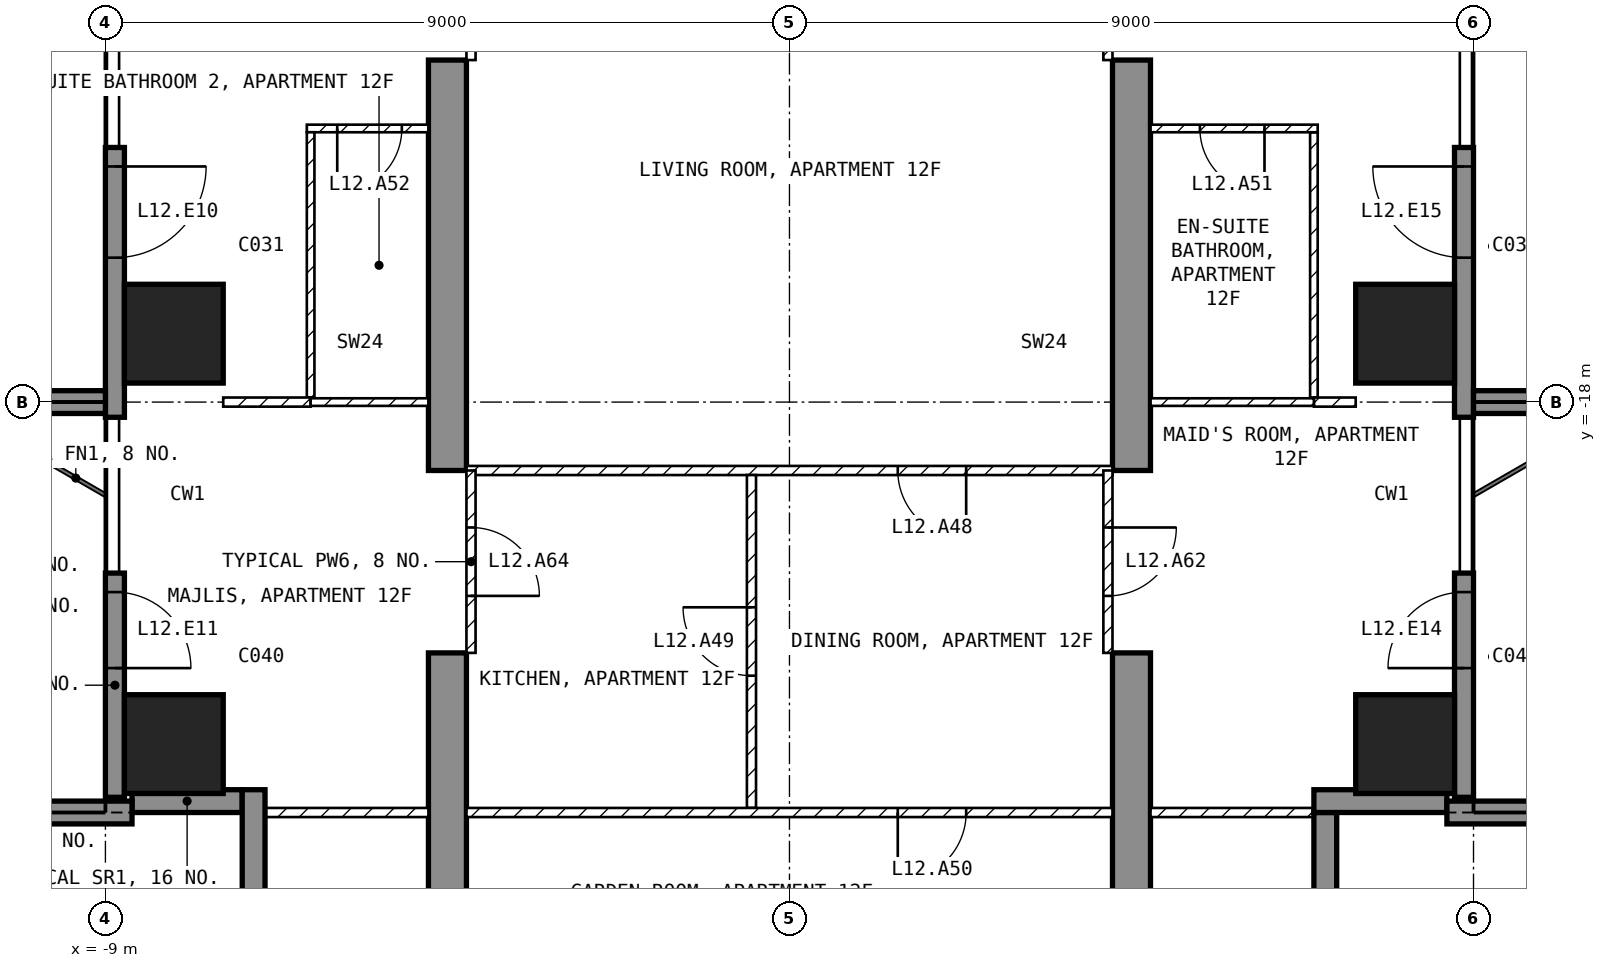
"""IFC4 building model, lengths in metres.
Left out: names, types, materials, properties, quantities, classifications, styles, units other than length and angle.
Written with IfcOpenShell. Run it as: python <this file> out.ifc"""

import sys

from ifc_helpers import new_model, si_unit, direction, frame, frame_2d, origin, origin_2d, place, context, subcontext, project, spatial, polyline, rectangle, outline, extrude, element, fill, save


model = new_model("IFC4")
c1 = context("Model", 3, precision=1e-05, world=origin(), true_north=direction((0.0, 1.0)))
c2 = subcontext(c1, "Body", "Model", "MODEL_VIEW")
j1 = project(units=[si_unit("LENGTHUNIT", "METRE"), si_unit("PLANEANGLEUNIT", "RADIAN")], contexts=[c1])
p1 = place(None, origin())
s1 = spatial("IfcSite", under=j1, at=p1, CompositionType="ELEMENT")
p2 = place(p1, origin())
s2 = spatial("IfcBuilding", under=s1, at=p2, CompositionType="ELEMENT")
p3 = place(p2, frame((0.0, 0.0, 61.0)))
s3 = spatial("IfcBuildingStorey", under=s2, at=p3, CompositionType="ELEMENT", Elevation=61.0)
for number, where, z_axis, x_axis in (
    (1, (-8.1, -22.5, -0.25), (0.0, 0.0, 1.0), (1.0, 0.0, 0.0)),
    (2, (-8.1, -17.1, -0.25), (0.0, 0.0, 1.0), (1.0, 0.0, 0.0)),
    (3, (8.1, -22.5, -0.25), (0.0, 0.0, 1.0), (1.0, 0.0, 0.0)),
    (4, (8.1, -17.1, -0.25), (0.0, 0.0, 1.0), (1.0, 0.0, 0.0)),
):
    element("IfcColumn", number, at=place(p3, frame(where, z_axis=z_axis, x_axis=x_axis)), inside=s3, PredefinedType="COLUMN", context=c2, shape_type="SweptSolid", body=[
        extrude(rectangle(XDim=1.3, YDim=1.3, at=origin_2d()), origin(), (0.0, 0.0, 1.0), 3.5),
    ])
for number, where, z_axis, x_axis in (
    (5, (-4.75, -25.45, -0.25), (1.0, 0.0, 0.0), (0.0, 1.0, 0.0)),
    (6, (4.25, -25.45, -0.25), (1.0, 0.0, 0.0), (0.0, 1.0, 0.0)),
):
    element("IfcWall", number, at=place(p3, frame(where, z_axis=z_axis, x_axis=x_axis)), inside=s3, PredefinedType="SHEAR", context=c2, shape_type="SweptSolid", body=[
        extrude(outline(polyline([(0.0, 0.0), (4.15, 0.0), (4.15, 2.65), (6.55, 2.65), (6.55, 0.0), (11.95, 0.0), (11.95, 2.65), (14.35, 2.65), (14.35, 0.0), (16.45, 0.0), (16.45, 3.5), (0.0, 3.5), (0.0, 0.0)])), origin(), (0.0, 0.0, 1.0), 0.5),
    ])
p4 = place(p3, frame((-8.875, -14.65, 0.0), z_axis=(0.0, 0.0, 1.0), x_axis=(0.0, -1.0, 0.0)))
e7 = element("IfcWall", 7, at=p4, inside=s3, PredefinedType="SOLIDWALL", context=c2, shape_type="SweptSolid", body=[
    extrude(rectangle(XDim=3.55, YDim=0.25, at=frame_2d((1.775, 0.0))), origin(), (0.0, 0.0, 1.0), 3.25),
])
p5 = place(p4, frame((0.25, 0.0, 0.0)))
e8 = element("IfcOpeningElement", 8, at=p5, cuts=e7, PredefinedType="OPENING", context=c2, shape_type="SweptSolid", body=[
    extrude(rectangle(XDim=1.2, YDim=2.4, at=frame_2d((0.6, 1.2))), frame((0.0, 0.135, 0.0), z_axis=(0.0, -1.0, 0.0), x_axis=(1.0, 0.0, 0.0)), (0.0, 0.0, 1.0), 0.27),
])
p6 = place(p3, frame((-8.875, -20.25, 0.0), z_axis=(0.0, 0.0, 1.0), x_axis=(0.0, -1.0, 0.0)))
e9 = element("IfcWall", 9, at=p6, inside=s3, PredefinedType="SOLIDWALL", context=c2, shape_type="SweptSolid", body=[
    extrude(rectangle(XDim=2.95, YDim=0.25, at=frame_2d((1.475, 0.0))), origin(), (0.0, 0.0, 1.0), 3.25),
])
p7 = place(p6, frame((0.25, 0.0, 0.0)))
e10 = element("IfcOpeningElement", 10, at=p7, cuts=e9, PredefinedType="OPENING", context=c2, shape_type="SweptSolid", body=[
    extrude(rectangle(XDim=1.0, YDim=2.4, at=frame_2d((0.5, 1.2))), frame((0.0, 0.135, 0.0), z_axis=(0.0, -1.0, 0.0), x_axis=(1.0, 0.0, 0.0)), (0.0, 0.0, 1.0), 0.27),
])
p8 = place(p3, frame((8.875, -23.2, 0.0), z_axis=(0.0, 0.0, 1.0), x_axis=(0.0, 1.0, 0.0)))
e11 = element("IfcWall", 11, at=p8, inside=s3, PredefinedType="SOLIDWALL", context=c2, shape_type="SweptSolid", body=[
    extrude(rectangle(XDim=2.95, YDim=0.25, at=frame_2d((1.475, 0.0))), origin(), (0.0, 0.0, 1.0), 3.25),
])
p9 = place(p8, frame((1.7, 0.0, 0.0)))
e12 = element("IfcOpeningElement", 12, at=p9, cuts=e11, PredefinedType="OPENING", context=c2, shape_type="SweptSolid", body=[
    extrude(rectangle(XDim=1.0, YDim=2.4, at=frame_2d((0.5, 1.2))), frame((0.0, 0.135, 0.0), z_axis=(0.0, -1.0, 0.0), x_axis=(1.0, 0.0, 0.0)), (0.0, 0.0, 1.0), 0.27),
])
p10 = place(p3, frame((8.875, -18.2, 0.0), z_axis=(0.0, 0.0, 1.0), x_axis=(0.0, 1.0, 0.0)))
e13 = element("IfcWall", 13, at=p10, inside=s3, PredefinedType="SOLIDWALL", context=c2, shape_type="SweptSolid", body=[
    extrude(rectangle(XDim=3.55, YDim=0.25, at=frame_2d((1.775, 0.0))), origin(), (0.0, 0.0, 1.0), 3.25),
])
p11 = place(p10, frame((2.1, 0.0, 0.0)))
e14 = element("IfcOpeningElement", 14, at=p11, cuts=e13, PredefinedType="OPENING", context=c2, shape_type="SweptSolid", body=[
    extrude(rectangle(XDim=1.2, YDim=2.4, at=frame_2d((0.6, 1.2))), frame((0.0, 0.135, 0.0), z_axis=(0.0, -1.0, 0.0), x_axis=(1.0, 0.0, 0.0)), (0.0, 0.0, 1.0), 0.27),
])
p12 = place(p3, frame((7.05, -25.2, 0.0), z_axis=(0.0, 0.0, 1.0), x_axis=(0.0, 1.0, 0.0)))
e15 = element("IfcWall", 15, at=p12, inside=s3, PredefinedType="SOLIDWALL", context=c2, shape_type="SweptSolid", body=[
    extrude(rectangle(XDim=1.8, YDim=0.3, at=frame_2d((0.9, 0.0))), origin(), (0.0, 0.0, 1.0), 3.25),
])
p13 = place(p3, frame((6.9, -23.25, 0.0), z_axis=(0.0, 0.0, 1.0), x_axis=(1.0, 0.0, 0.0)))
e16 = element("IfcWall", 16, at=p13, inside=s3, PredefinedType="SOLIDWALL", context=c2, shape_type="SweptSolid", body=[
    extrude(rectangle(XDim=1.75, YDim=0.3, at=frame_2d((0.875, 0.0))), origin(), (0.0, 0.0, 1.0), 3.25),
])
p14 = place(p3, frame((-8.65, -23.25, 0.0), z_axis=(0.0, 0.0, 1.0), x_axis=(1.0, 0.0, 0.0)))
e17 = element("IfcWall", 17, at=p14, inside=s3, PredefinedType="SOLIDWALL", context=c2, shape_type="SweptSolid", body=[
    extrude(rectangle(XDim=1.45, YDim=0.3, at=frame_2d((0.725, 0.0))), origin(), (0.0, 0.0, 1.0), 3.25),
])
p15 = place(p3, frame((-7.05, -23.1, 0.0), z_axis=(0.0, 0.0, 1.0), x_axis=(0.0, -1.0, 0.0)))
e18 = element("IfcWall", 18, at=p15, inside=s3, PredefinedType="SOLIDWALL", context=c2, shape_type="SweptSolid", body=[
    extrude(rectangle(XDim=1.8, YDim=0.3, at=frame_2d((0.9, 0.0))), origin(), (0.0, 0.0, 1.0), 3.25),
])
p16 = place(p3, frame((-8.65, -23.4, 0.0), z_axis=(0.0, 0.0, 1.0), x_axis=(-1.0, 0.0, 0.0)))
e19 = element("IfcWall", 19, at=p16, inside=s3, PredefinedType="SOLIDWALL", context=c2, shape_type="SweptSolid", body=[
    extrude(rectangle(XDim=3.05, YDim=0.3, at=frame_2d((1.525, 0.0))), origin(), (0.0, 0.0, 1.0), 3.25),
])
p17 = place(p3, frame((-9.0, -18.0, 0.0), z_axis=(0.0, 0.0, 1.0), x_axis=(-1.0, 0.0, 0.0)))
e20 = element("IfcWall", 20, at=p17, inside=s3, PredefinedType="SOLIDWALL", context=c2, shape_type="SweptSolid", body=[
    extrude(rectangle(XDim=2.7, YDim=0.3, at=frame_2d((1.35, 0.0))), origin(), (0.0, 0.0, 1.0), 3.25),
])
p18 = place(p3, frame((8.65, -23.4, 0.0), z_axis=(0.0, 0.0, 1.0), x_axis=(1.0, 0.0, 0.0)))
e21 = element("IfcWall", 21, at=p18, inside=s3, PredefinedType="SOLIDWALL", context=c2, shape_type="SweptSolid", body=[
    extrude(rectangle(XDim=3.05, YDim=0.3, at=frame_2d((1.525, 0.0))), origin(), (0.0, 0.0, 1.0), 3.25),
])
p19 = place(p3, frame((9.0, -18.0, 0.0), z_axis=(0.0, 0.0, 1.0), x_axis=(1.0, 0.0, 0.0)))
e22 = element("IfcWall", 22, at=p19, inside=s3, PredefinedType="SOLIDWALL", context=c2, shape_type="SweptSolid", body=[
    extrude(rectangle(XDim=2.7, YDim=0.3, at=frame_2d((1.35, 0.0))), origin(), (0.0, 0.0, 1.0), 3.25),
])
p20 = place(p3, frame((4.25, -18.9, 0.0), z_axis=(0.0, 0.0, 1.0), x_axis=(-1.0, 0.0, 0.0)))
e23 = element("IfcWall", 23, at=p20, inside=s3, PredefinedType="PARTITIONING", context=c2, shape_type="SweptSolid", body=[
    extrude(rectangle(XDim=8.5, YDim=0.12, at=frame_2d((4.25, 0.0))), origin(), (0.0, 0.0, 1.0), 3.25),
])
p21 = place(p20, frame((1.925, 0.0, 0.0)))
e24 = element("IfcOpeningElement", 24, at=p21, cuts=e23, PredefinedType="OPENING", context=c2, shape_type="SweptSolid", body=[
    extrude(rectangle(XDim=0.9, YDim=2.1, at=frame_2d((0.45, 1.05))), frame((0.0, 0.07, 0.0), z_axis=(0.0, -1.0, 0.0), x_axis=(1.0, 0.0, 0.0)), (0.0, 0.0, 1.0), 0.14),
])
p22 = place(p3, frame((-0.5, -23.34, 0.0), z_axis=(0.0, 0.0, 1.0), x_axis=(0.0, 1.0, 0.0)))
e25 = element("IfcWall", 25, at=p22, inside=s3, PredefinedType="PARTITIONING", context=c2, shape_type="SweptSolid", body=[
    extrude(rectangle(XDim=4.38, YDim=0.12, at=frame_2d((2.19, 0.0))), origin(), (0.0, 0.0, 1.0), 3.25),
])
p23 = place(p22, frame((1.74, 0.0, 0.0)))
e26 = element("IfcOpeningElement", 26, at=p23, cuts=e25, PredefinedType="OPENING", context=c2, shape_type="SweptSolid", body=[
    extrude(rectangle(XDim=0.9, YDim=2.1, at=frame_2d((0.45, 1.05))), frame((0.0, 0.07, 0.0), z_axis=(0.0, -1.0, 0.0), x_axis=(1.0, 0.0, 0.0)), (0.0, 0.0, 1.0), 0.14),
])
p24 = place(p3, frame((4.25, -23.4, 0.0), z_axis=(0.0, 0.0, 1.0), x_axis=(-1.0, 0.0, 0.0)))
e27 = element("IfcWall", 27, at=p24, inside=s3, PredefinedType="PARTITIONING", context=c2, shape_type="SweptSolid", body=[
    extrude(rectangle(XDim=8.5, YDim=0.12, at=frame_2d((4.25, 0.0))), origin(), (0.0, 0.0, 1.0), 3.25),
])
p25 = place(p24, frame((1.925, 0.0, 0.0)))
e28 = element("IfcOpeningElement", 28, at=p25, cuts=e27, PredefinedType="OPENING", context=c2, shape_type="SweptSolid", body=[
    extrude(rectangle(XDim=0.9, YDim=2.1, at=frame_2d((0.45, 1.05))), frame((0.0, 0.07, 0.0), z_axis=(0.0, -1.0, 0.0), x_axis=(1.0, 0.0, 0.0)), (0.0, 0.0, 1.0), 0.14),
])
p26 = place(p3, frame((6.9, -17.94, 0.0), z_axis=(0.0, 0.0, 1.0), x_axis=(0.0, 1.0, 0.0)))
e29 = element("IfcWall", 29, at=p26, inside=s3, PredefinedType="PARTITIONING", context=c2, shape_type="SweptSolid", body=[
    extrude(rectangle(XDim=3.49, YDim=0.1, at=frame_2d((1.745, 0.0))), origin(), (0.0, 0.0, 1.0), 3.25),
])
p27 = place(p3, frame((6.95, -14.4, 0.0), z_axis=(0.0, 0.0, 1.0), x_axis=(-1.0, 0.0, 0.0)))
e30 = element("IfcWall", 30, at=p27, inside=s3, PredefinedType="PARTITIONING", context=c2, shape_type="SweptSolid", body=[
    extrude(rectangle(XDim=2.2, YDim=0.1, at=frame_2d((1.1, 0.0))), origin(), (0.0, 0.0, 1.0), 3.25),
])
p28 = place(p27, frame((0.7, 0.0, 0.0)))
e31 = element("IfcOpeningElement", 31, at=p28, cuts=e30, PredefinedType="OPENING", context=c2, shape_type="SweptSolid", body=[
    extrude(rectangle(XDim=0.85, YDim=2.1, at=frame_2d((0.425, 1.05))), frame((0.0, 0.06, 0.0), z_axis=(0.0, -1.0, 0.0), x_axis=(1.0, 0.0, 0.0)), (0.0, 0.0, 1.0), 0.12),
])
p29 = place(p3, frame((7.45, -18.0, 0.0), z_axis=(0.0, 0.0, 1.0), x_axis=(-1.0, 0.0, 0.0)))
e32 = element("IfcWall", 32, at=p29, inside=s3, PredefinedType="PARTITIONING", context=c2, shape_type="SweptSolid", body=[
    extrude(rectangle(XDim=0.55, YDim=0.12, at=frame_2d((0.275, 0.0))), origin(), (0.0, 0.0, 1.0), 3.25),
])
p30 = place(p3, frame((6.9, -18.0, 0.0), z_axis=(0.0, 0.0, 1.0), x_axis=(-1.0, 0.0, 0.0)))
e33 = element("IfcWall", 33, at=p30, inside=s3, PredefinedType="PARTITIONING", context=c2, shape_type="SweptSolid", body=[
    extrude(rectangle(XDim=2.15, YDim=0.1, at=frame_2d((1.075, 0.0))), origin(), (0.0, 0.0, 1.0), 3.25),
])
p31 = place(p3, frame((7.12, -23.4, 0.0), z_axis=(0.0, 0.0, 1.0), x_axis=(-1.0, 0.0, 0.0)))
e34 = element("IfcWall", 34, at=p31, inside=s3, PredefinedType="PARTITIONING", context=c2, shape_type="SweptSolid", body=[
    extrude(rectangle(XDim=2.37, YDim=0.12, at=frame_2d((1.185, 0.0))), origin(), (0.0, 0.0, 1.0), 3.25),
])
p32 = place(p3, frame((-4.75, -14.4, 0.0), z_axis=(0.0, 0.0, 1.0), x_axis=(-1.0, 0.0, 0.0)))
e35 = element("IfcWall", 35, at=p32, inside=s3, PredefinedType="PARTITIONING", context=c2, shape_type="SweptSolid", body=[
    extrude(rectangle(XDim=1.6, YDim=0.1, at=frame_2d((0.8, 0.0))), origin(), (0.0, 0.0, 1.0), 3.25),
])
p33 = place(p32, frame((0.35, 0.0, 0.0)))
e36 = element("IfcOpeningElement", 36, at=p33, cuts=e35, PredefinedType="OPENING", context=c2, shape_type="SweptSolid", body=[
    extrude(rectangle(XDim=0.85, YDim=2.1, at=frame_2d((0.425, 1.05))), frame((0.0, 0.06, 0.0), z_axis=(0.0, -1.0, 0.0), x_axis=(1.0, 0.0, 0.0)), (0.0, 0.0, 1.0), 0.12),
])
p34 = place(p3, frame((-6.3, -14.45, 0.0), z_axis=(0.0, 0.0, 1.0), x_axis=(0.0, -1.0, 0.0)))
e37 = element("IfcWall", 37, at=p34, inside=s3, PredefinedType="PARTITIONING", context=c2, shape_type="SweptSolid", body=[
    extrude(rectangle(XDim=3.49, YDim=0.1, at=frame_2d((1.745, 0.0))), origin(), (0.0, 0.0, 1.0), 3.25),
])
p35 = place(p3, frame((-6.3, -18.0, 0.0), z_axis=(0.0, 0.0, 1.0), x_axis=(-1.0, 0.0, 0.0)))
e38 = element("IfcWall", 38, at=p35, inside=s3, PredefinedType="PARTITIONING", context=c2, shape_type="SweptSolid", body=[
    extrude(rectangle(XDim=1.15, YDim=0.12, at=frame_2d((0.575, 0.0))), origin(), (0.0, 0.0, 1.0), 3.25),
])
p36 = place(p3, frame((-4.75, -18.0, 0.0), z_axis=(0.0, 0.0, 1.0), x_axis=(-1.0, 0.0, 0.0)))
e39 = element("IfcWall", 39, at=p36, inside=s3, PredefinedType="PARTITIONING", context=c2, shape_type="SweptSolid", body=[
    extrude(rectangle(XDim=1.55, YDim=0.1, at=frame_2d((0.775, 0.0))), origin(), (0.0, 0.0, 1.0), 3.25),
])
p37 = place(p3, frame((-4.75, -23.4, 0.0), z_axis=(0.0, 0.0, 1.0), x_axis=(-1.0, 0.0, 0.0)))
e40 = element("IfcWall", 40, at=p37, inside=s3, PredefinedType="PARTITIONING", context=c2, shape_type="SweptSolid", body=[
    extrude(rectangle(XDim=2.37, YDim=0.12, at=frame_2d((1.185, 0.0))), origin(), (0.0, 0.0, 1.0), 3.25),
])
p38 = place(p3, frame((4.19, -11.1, 0.0), z_axis=(0.0, 0.0, 1.0), x_axis=(0.0, -1.0, 0.0)))
e41 = element("IfcWall", 41, at=p38, inside=s3, PredefinedType="PARTITIONING", context=c2, shape_type="SweptSolid", body=[
    extrude(rectangle(XDim=2.4, YDim=0.12, at=frame_2d((1.2, 0.0))), origin(), (0.0, 0.0, 1.0), 2.4),
])
p39 = place(p38, frame((0.75, 0.0, 0.0)))
e42 = element("IfcOpeningElement", 42, at=p39, cuts=e41, PredefinedType="OPENING", context=c2, shape_type="SweptSolid", body=[
    extrude(rectangle(XDim=0.9, YDim=2.1, at=frame_2d((0.45, 1.05))), frame((0.0, 0.07, 0.0), z_axis=(0.0, -1.0, 0.0), x_axis=(1.0, 0.0, 0.0)), (0.0, 0.0, 1.0), 0.14),
])
p40 = place(p3, frame((4.19, -18.9, 0.0), z_axis=(0.0, 0.0, 1.0), x_axis=(0.0, -1.0, 0.0)))
e43 = element("IfcWall", 43, at=p40, inside=s3, PredefinedType="PARTITIONING", context=c2, shape_type="SweptSolid", body=[
    extrude(rectangle(XDim=2.4, YDim=0.12, at=frame_2d((1.2, 0.0))), origin(), (0.0, 0.0, 1.0), 2.4),
])
p41 = place(p40, frame((0.75, 0.0, 0.0)))
e44 = element("IfcOpeningElement", 44, at=p41, cuts=e43, PredefinedType="OPENING", context=c2, shape_type="SweptSolid", body=[
    extrude(rectangle(XDim=0.9, YDim=2.1, at=frame_2d((0.45, 1.05))), frame((0.0, 0.07, 0.0), z_axis=(0.0, -1.0, 0.0), x_axis=(1.0, 0.0, 0.0)), (0.0, 0.0, 1.0), 0.14),
])
p42 = place(p3, frame((-4.19, -11.1, 0.0), z_axis=(0.0, 0.0, 1.0), x_axis=(0.0, -1.0, 0.0)))
e45 = element("IfcWall", 45, at=p42, inside=s3, PredefinedType="PARTITIONING", context=c2, shape_type="SweptSolid", body=[
    extrude(rectangle(XDim=2.4, YDim=0.12, at=frame_2d((1.2, 0.0))), origin(), (0.0, 0.0, 1.0), 2.4),
])
p43 = place(p42, frame((0.75, 0.0, 0.0)))
e46 = element("IfcOpeningElement", 46, at=p43, cuts=e45, PredefinedType="OPENING", context=c2, shape_type="SweptSolid", body=[
    extrude(rectangle(XDim=0.9, YDim=2.1, at=frame_2d((0.45, 1.05))), frame((0.0, 0.07, 0.0), z_axis=(0.0, -1.0, 0.0), x_axis=(1.0, 0.0, 0.0)), (0.0, 0.0, 1.0), 0.14),
])
p44 = place(p3, frame((-4.19, -18.9, 0.0), z_axis=(0.0, 0.0, 1.0), x_axis=(0.0, -1.0, 0.0)))
e47 = element("IfcWall", 47, at=p44, inside=s3, PredefinedType="PARTITIONING", context=c2, shape_type="SweptSolid", body=[
    extrude(rectangle(XDim=2.4, YDim=0.12, at=frame_2d((1.2, 0.0))), origin(), (0.0, 0.0, 1.0), 2.4),
])
p45 = place(p44, frame((0.75, 0.0, 0.0)))
e48 = element("IfcOpeningElement", 48, at=p45, cuts=e47, PredefinedType="OPENING", context=c2, shape_type="SweptSolid", body=[
    extrude(rectangle(XDim=0.9, YDim=2.1, at=frame_2d((0.45, 1.05))), frame((0.0, 0.07, 0.0), z_axis=(0.0, -1.0, 0.0), x_axis=(1.0, 0.0, 0.0)), (0.0, 0.0, 1.0), 0.14),
])
p46 = place(p5, origin())
e49 = element("IfcDoor", 49, at=p46, inside=s3, OperationType="SINGLE_SWING_LEFT", PredefinedType="DOOR", context=c2, shape_type="SweptSolid", body=[
    extrude(rectangle(XDim=1.2, YDim=2.4, at=frame_2d((0.6, 1.2))), frame((0.0, 0.025, 0.0), z_axis=(0.0, -1.0, 0.0), x_axis=(1.0, 0.0, 0.0)), (0.0, 0.0, 1.0), 0.05),
])
fill(e8, e49)
p47 = place(p7, origin())
e50 = element("IfcDoor", 50, at=p47, inside=s3, OperationType="SINGLE_SWING_RIGHT", PredefinedType="DOOR", context=c2, shape_type="SweptSolid", body=[
    extrude(rectangle(XDim=1.0, YDim=2.4, at=frame_2d((0.5, 1.2))), frame((0.0, 0.025, 0.0), z_axis=(0.0, -1.0, 0.0), x_axis=(1.0, 0.0, 0.0)), (0.0, 0.0, 1.0), 0.05),
])
fill(e10, e50)
p48 = place(p9, origin())
e51 = element("IfcDoor", 51, at=p48, inside=s3, OperationType="SINGLE_SWING_LEFT", PredefinedType="DOOR", context=c2, shape_type="SweptSolid", body=[
    extrude(rectangle(XDim=1.0, YDim=2.4, at=frame_2d((0.5, 1.2))), frame((0.0, 0.025, 0.0), z_axis=(0.0, -1.0, 0.0), x_axis=(1.0, 0.0, 0.0)), (0.0, 0.0, 1.0), 0.05),
])
fill(e12, e51)
p49 = place(p11, origin())
e52 = element("IfcDoor", 52, at=p49, inside=s3, OperationType="SINGLE_SWING_RIGHT", PredefinedType="DOOR", context=c2, shape_type="SweptSolid", body=[
    extrude(rectangle(XDim=1.2, YDim=2.4, at=frame_2d((0.6, 1.2))), frame((0.0, 0.025, 0.0), z_axis=(0.0, -1.0, 0.0), x_axis=(1.0, 0.0, 0.0)), (0.0, 0.0, 1.0), 0.05),
])
fill(e14, e52)
p50 = place(p21, origin())
e53 = element("IfcDoor", 53, at=p50, inside=s3, OperationType="SINGLE_SWING_LEFT", PredefinedType="DOOR", context=c2, shape_type="SweptSolid", body=[
    extrude(rectangle(XDim=0.9, YDim=2.1, at=frame_2d((0.45, 1.05))), frame((0.0, 0.025, 0.0), z_axis=(0.0, -1.0, 0.0), x_axis=(1.0, 0.0, 0.0)), (0.0, 0.0, 1.0), 0.05),
])
fill(e24, e53)
p51 = place(p23, origin())
e54 = element("IfcDoor", 54, at=p51, inside=s3, OperationType="SINGLE_SWING_RIGHT", PredefinedType="DOOR", context=c2, shape_type="SweptSolid", body=[
    extrude(rectangle(XDim=0.9, YDim=2.1, at=frame_2d((0.45, 1.05))), frame((0.0, 0.025, 0.0), z_axis=(0.0, -1.0, 0.0), x_axis=(1.0, 0.0, 0.0)), (0.0, 0.0, 1.0), 0.05),
])
fill(e26, e54)
p52 = place(p25, origin())
e55 = element("IfcDoor", 55, at=p52, inside=s3, OperationType="SINGLE_SWING_RIGHT", PredefinedType="DOOR", context=c2, shape_type="SweptSolid", body=[
    extrude(rectangle(XDim=0.9, YDim=2.1, at=frame_2d((0.45, 1.05))), frame((0.0, 0.025, 0.0), z_axis=(0.0, -1.0, 0.0), x_axis=(1.0, 0.0, 0.0)), (0.0, 0.0, 1.0), 0.05),
])
fill(e28, e55)
p53 = place(p28, origin())
e56 = element("IfcDoor", 56, at=p53, inside=s3, OperationType="SINGLE_SWING_LEFT", PredefinedType="DOOR", context=c2, shape_type="SweptSolid", body=[
    extrude(rectangle(XDim=0.85, YDim=2.1, at=frame_2d((0.425, 1.05))), frame((0.0, 0.025, 0.0), z_axis=(0.0, -1.0, 0.0), x_axis=(1.0, 0.0, 0.0)), (0.0, 0.0, 1.0), 0.05),
])
fill(e31, e56)
p54 = place(p33, origin())
e57 = element("IfcDoor", 57, at=p54, inside=s3, OperationType="SINGLE_SWING_RIGHT", PredefinedType="DOOR", context=c2, shape_type="SweptSolid", body=[
    extrude(rectangle(XDim=0.85, YDim=2.1, at=frame_2d((0.425, 1.05))), frame((0.0, 0.025, 0.0), z_axis=(0.0, -1.0, 0.0), x_axis=(1.0, 0.0, 0.0)), (0.0, 0.0, 1.0), 0.05),
])
fill(e36, e57)
p55 = place(p41, origin())
e58 = element("IfcDoor", 58, at=p55, inside=s3, OperationType="SINGLE_SWING_LEFT", PredefinedType="DOOR", context=c2, shape_type="SweptSolid", body=[
    extrude(rectangle(XDim=0.9, YDim=2.1, at=frame_2d((0.45, 1.05))), frame((0.0, 0.025, 0.0), z_axis=(0.0, -1.0, 0.0), x_axis=(1.0, 0.0, 0.0)), (0.0, 0.0, 1.0), 0.05),
])
fill(e44, e58)
p56 = place(p45, origin())
e59 = element("IfcDoor", 59, at=p56, inside=s3, OperationType="SINGLE_SWING_RIGHT", PredefinedType="DOOR", context=c2, shape_type="SweptSolid", body=[
    extrude(rectangle(XDim=0.9, YDim=2.1, at=frame_2d((0.45, 1.05))), frame((0.0, 0.025, 0.0), z_axis=(0.0, -1.0, 0.0), x_axis=(1.0, 0.0, 0.0)), (0.0, 0.0, 1.0), 0.05),
])
fill(e48, e59)
save(model, sys.argv[1])
